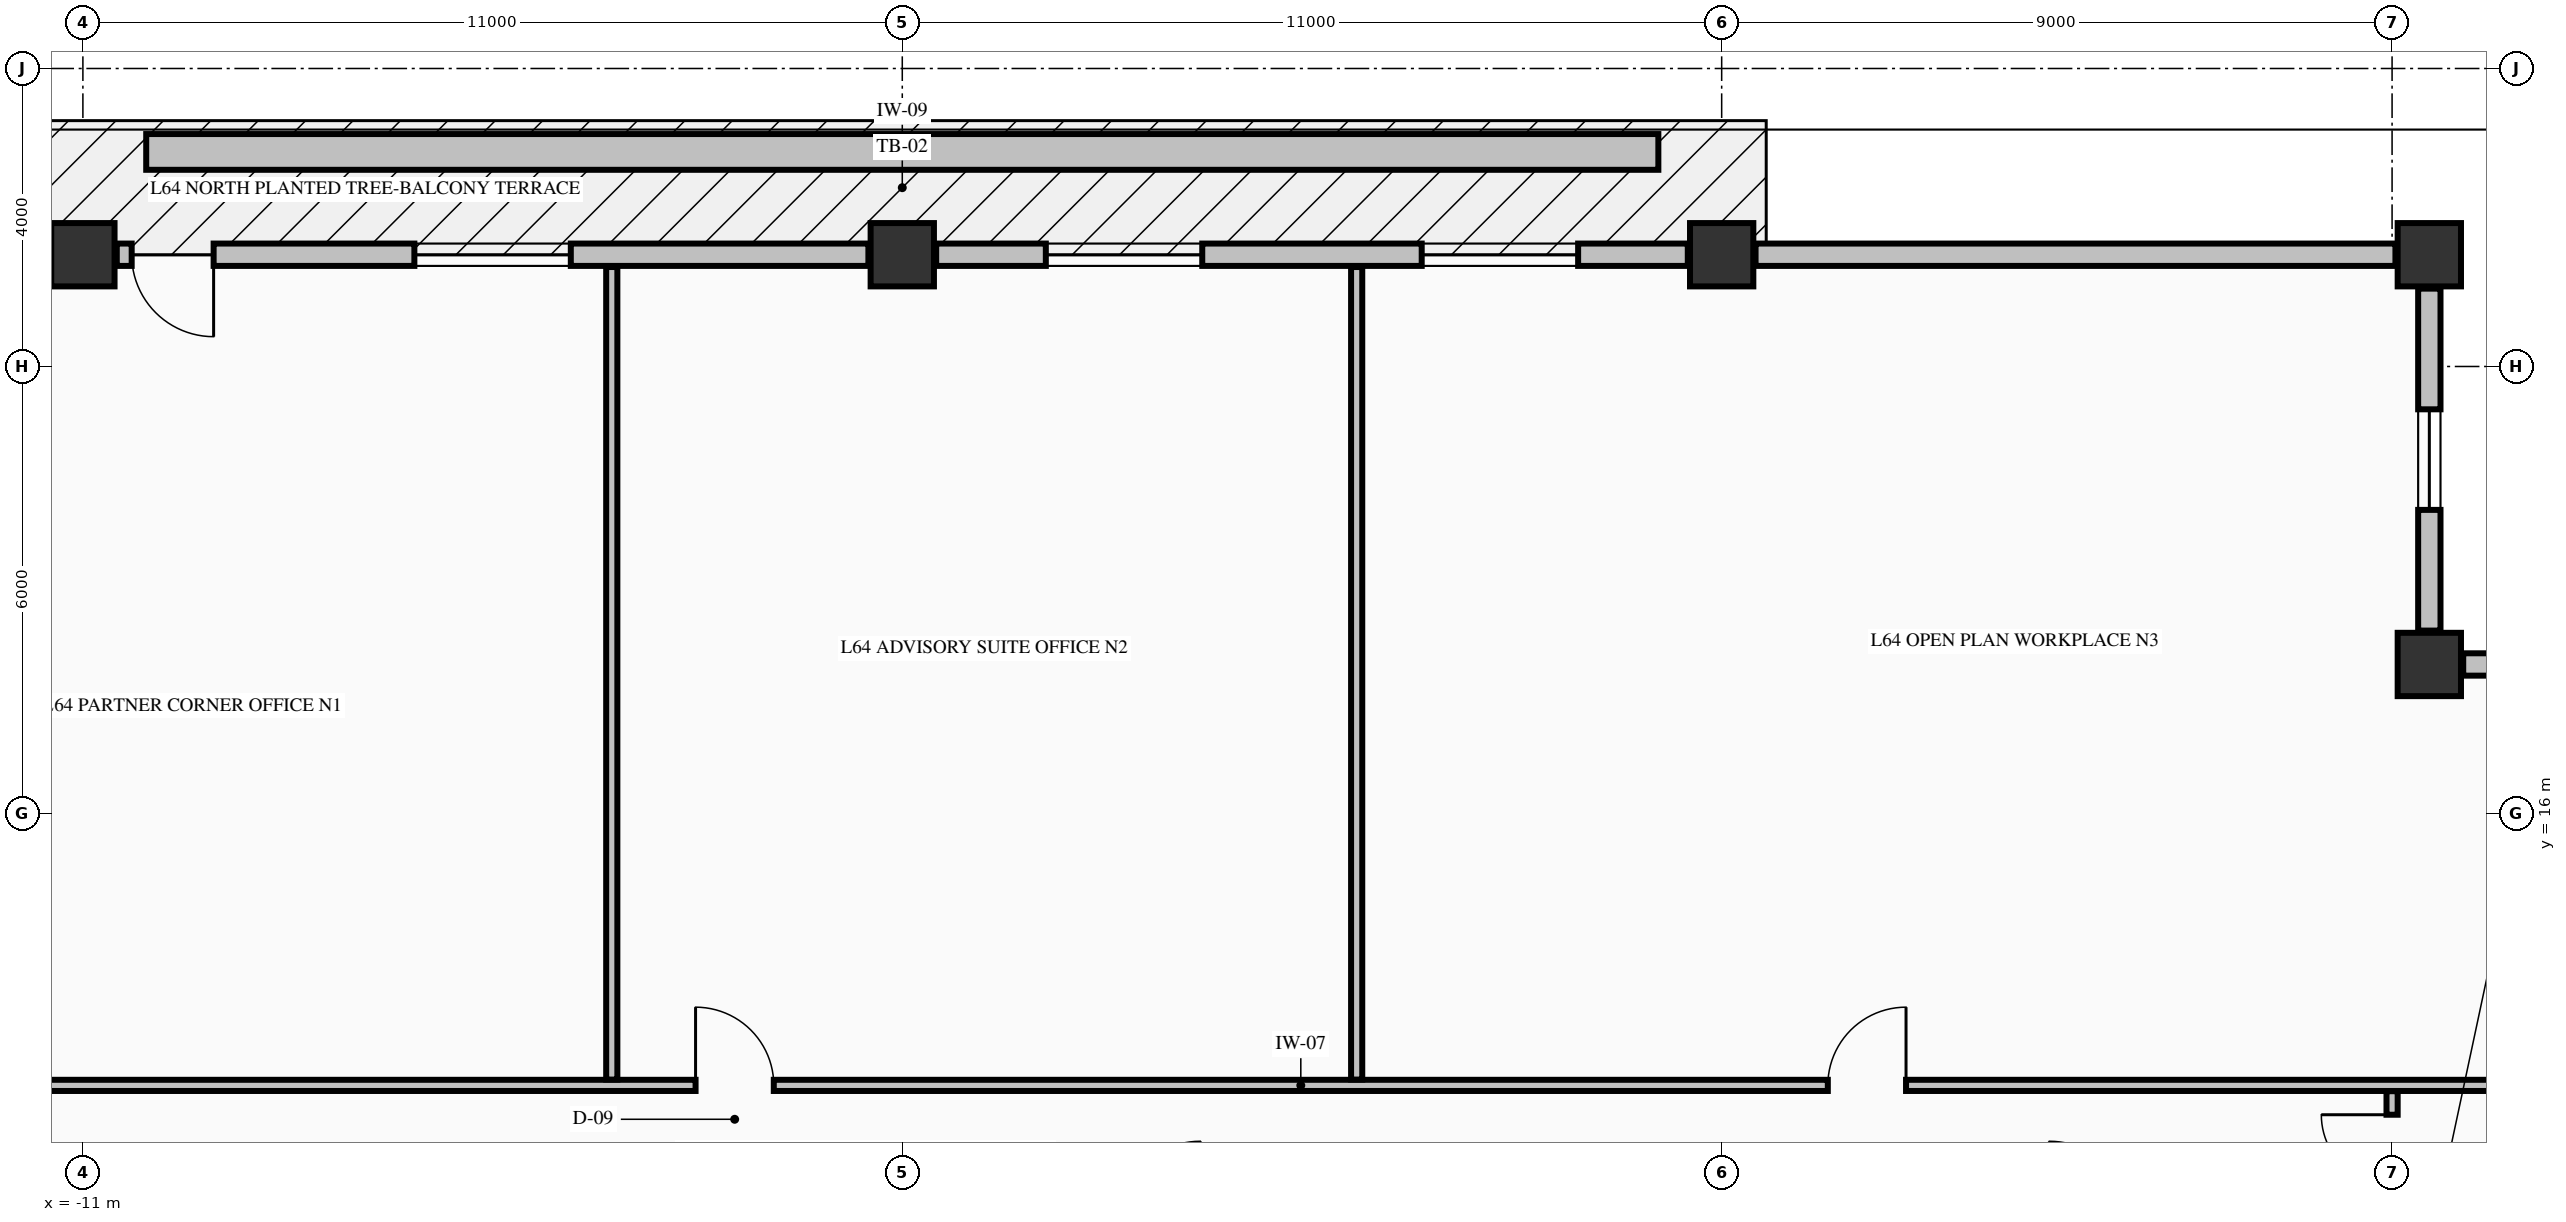
"""IFC4 building model, lengths in metres.
Left out: names, types, materials, properties, quantities, classifications, styles, units other than length and angle.
Written with IfcOpenShell. Run it as: python <this file> out.ifc"""

import sys

from ifc_helpers import new_model, si_unit, direction, frame, frame_2d, origin, origin_2d, place, context, subcontext, project, spatial, rectangle, extrude, element, fill, save


model = new_model("IFC4")
c1 = context("Model", 3, precision=1e-05, world=origin(), true_north=direction((0.0, 1.0)))
c2 = subcontext(c1, "Body", "Model", "MODEL_VIEW")
j1 = project(units=[si_unit("LENGTHUNIT", "METRE"), si_unit("PLANEANGLEUNIT", "RADIAN")], contexts=[c1])
p1 = place(None, origin())
s1 = spatial("IfcSite", under=j1, at=p1, CompositionType="ELEMENT")
p2 = place(p1, origin())
s2 = spatial("IfcBuilding", under=s1, at=p2, CompositionType="ELEMENT")
p3 = place(p2, frame((0.0, 0.0, 242.97)))
s3 = spatial("IfcBuildingStorey", under=s2, at=p3, CompositionType="ELEMENT", Elevation=242.97)
for number, where, z_axis, x_axis in (
    (1, (-11.0, 23.5, -0.25), (0.0, 0.0, 1.0), (1.0, 0.0, 0.0)),
    (2, (0.0, 23.5, -0.25), (0.0, 0.0, 1.0), (1.0, 0.0, 0.0)),
    (3, (11.0, 23.5, -0.25), (0.0, 0.0, 1.0), (1.0, 0.0, 0.0)),
    (4, (20.5, 23.5, -0.25), (0.0, 0.0, 1.0), (1.0, 0.0, 0.0)),
    (5, (20.5, 18.0, -0.25), (0.0, 0.0, 1.0), (1.0, 0.0, 0.0)),
):
    element("IfcColumn", number, at=place(p3, frame(where, z_axis=z_axis, x_axis=x_axis)), inside=s3, PredefinedType="COLUMN", context=c2, shape_type="SweptSolid", body=[
        extrude(rectangle(XDim=0.85, YDim=0.85, at=origin_2d()), origin(), (0.0, 0.0, 1.0), 3.23),
    ])
p4 = place(p3, frame((25.545, 18.0, 0.0), z_axis=(0.0, 0.0, 1.0), x_axis=(-1.0, 0.0, 0.0)))
e6 = element("IfcWall", 6, at=p4, inside=s3, PredefinedType="STANDARD", context=c2, shape_type="SweptSolid", body=[
    extrude(rectangle(XDim=4.59, YDim=0.3, at=frame_2d((2.295, 0.0))), origin(), (0.0, 0.0, 1.0), 2.372),
])
p5 = place(p4, frame((1.62, 0.0, 0.68)))
e7 = element("IfcOpeningElement", 7, at=p5, cuts=e6, PredefinedType="OPENING", context=c2, shape_type="SweptSolid", body=[
    extrude(rectangle(XDim=1.35, YDim=1.42, at=frame_2d((0.675, 0.71))), frame((0.0, 0.16, 0.0), z_axis=(0.0, -1.0, 0.0), x_axis=(1.0, 0.0, 0.0)), (0.0, 0.0, 1.0), 0.32),
])
p6 = place(p3, frame((20.5, 18.455, 0.0), z_axis=(0.0, 0.0, 1.0), x_axis=(0.0, 1.0, 0.0)))
e8 = element("IfcWall", 8, at=p6, inside=s3, PredefinedType="STANDARD", context=c2, shape_type="SweptSolid", body=[
    extrude(rectangle(XDim=4.59, YDim=0.3, at=frame_2d((2.295, 0.0))), origin(), (0.0, 0.0, 1.0), 2.372),
])
p7 = place(p6, frame((1.62, 0.0, 0.68)))
e9 = element("IfcOpeningElement", 9, at=p7, cuts=e8, PredefinedType="OPENING", context=c2, shape_type="SweptSolid", body=[
    extrude(rectangle(XDim=1.35, YDim=1.42, at=frame_2d((0.675, 0.71))), frame((0.0, 0.16, 0.0), z_axis=(0.0, -1.0, 0.0), x_axis=(1.0, 0.0, 0.0)), (0.0, 0.0, 1.0), 0.32),
])
p8 = place(p3, frame((-0.455, 23.5, 0.0), z_axis=(0.0, 0.0, 1.0), x_axis=(-1.0, 0.0, 0.0)))
e10 = element("IfcWall", 10, at=p8, inside=s3, PredefinedType="STANDARD", context=c2, shape_type="SweptSolid", body=[
    extrude(rectangle(XDim=10.09, YDim=0.3, at=frame_2d((5.045, 0.0))), origin(), (0.0, 0.0, 1.0), 2.372),
])
p9 = place(p8, frame((8.79, 0.0, 0.0)))
e11 = element("IfcOpeningElement", 11, at=p9, cuts=e10, PredefinedType="OPENING", context=c2, shape_type="SweptSolid", body=[
    extrude(rectangle(XDim=1.1, YDim=2.15, at=frame_2d((0.55, 1.075))), frame((0.0, 0.16, 0.0), z_axis=(0.0, -1.0, 0.0), x_axis=(1.0, 0.0, 0.0)), (0.0, 0.0, 1.0), 0.32),
])
p10 = place(p8, frame((3.995, 0.0, 0.7)))
e12 = element("IfcOpeningElement", 12, at=p10, cuts=e10, PredefinedType="OPENING", context=c2, shape_type="SweptSolid", body=[
    extrude(rectangle(XDim=2.1, YDim=1.5, at=frame_2d((1.05, 0.75))), frame((0.0, 0.16, 0.0), z_axis=(0.0, -1.0, 0.0), x_axis=(1.0, 0.0, 0.0)), (0.0, 0.0, 1.0), 0.32),
])
p11 = place(p3, frame((10.545, 23.5, 0.0), z_axis=(0.0, 0.0, 1.0), x_axis=(-1.0, 0.0, 0.0)))
e13 = element("IfcWall", 13, at=p11, inside=s3, PredefinedType="STANDARD", context=c2, shape_type="SweptSolid", body=[
    extrude(rectangle(XDim=10.09, YDim=0.3, at=frame_2d((5.045, 0.0))), origin(), (0.0, 0.0, 1.0), 2.372),
])
p12 = place(p11, frame((1.472, 0.0, 0.7)))
e14 = element("IfcOpeningElement", 14, at=p12, cuts=e13, PredefinedType="OPENING", context=c2, shape_type="SweptSolid", body=[
    extrude(rectangle(XDim=2.1, YDim=1.5, at=frame_2d((1.05, 0.75))), frame((0.0, 0.16, 0.0), z_axis=(0.0, -1.0, 0.0), x_axis=(1.0, 0.0, 0.0)), (0.0, 0.0, 1.0), 0.32),
])
p13 = place(p11, frame((6.518, 0.0, 0.7)))
e15 = element("IfcOpeningElement", 15, at=p13, cuts=e13, PredefinedType="OPENING", context=c2, shape_type="SweptSolid", body=[
    extrude(rectangle(XDim=2.1, YDim=1.5, at=frame_2d((1.05, 0.75))), frame((0.0, 0.16, 0.0), z_axis=(0.0, -1.0, 0.0), x_axis=(1.0, 0.0, 0.0)), (0.0, 0.0, 1.0), 0.32),
])
p14 = place(p3, frame((20.045, 23.5, 0.0), z_axis=(0.0, 0.0, 1.0), x_axis=(-1.0, 0.0, 0.0)))
e16 = element("IfcWall", 16, at=p14, inside=s3, PredefinedType="STANDARD", context=c2, shape_type="SweptSolid", body=[
    extrude(rectangle(XDim=8.59, YDim=0.3, at=frame_2d((4.295, 0.0))), origin(), (0.0, 0.0, 1.0), 2.372),
])
p15 = place(p3, frame((-20.075, 12.35, 0.0), z_axis=(0.0, 0.0, 1.0), x_axis=(1.0, 0.0, 0.0)))
e17 = element("IfcWall", 17, at=p15, inside=s3, PredefinedType="PARTITIONING", context=c2, shape_type="SweptSolid", body=[
    extrude(rectangle(XDim=45.91, YDim=0.15, at=frame_2d((22.955, 0.0))), origin(), (0.0, 0.0, 1.0), 2.98),
])
p16 = place(p15, frame((5.7, 0.0, 0.0)))
e18 = element("IfcOpeningElement", 18, at=p16, cuts=e17, PredefinedType="OPENING", context=c2, shape_type="SweptSolid", body=[
    extrude(rectangle(XDim=1.05, YDim=2.15, at=frame_2d((0.525, 1.075))), frame((0.0, 0.085, 0.0), z_axis=(0.0, -1.0, 0.0), x_axis=(1.0, 0.0, 0.0)), (0.0, 0.0, 1.0), 0.17),
])
p17 = place(p15, frame((17.3, 0.0, 0.0)))
e19 = element("IfcOpeningElement", 19, at=p17, cuts=e17, PredefinedType="OPENING", context=c2, shape_type="SweptSolid", body=[
    extrude(rectangle(XDim=1.05, YDim=2.15, at=frame_2d((0.525, 1.075))), frame((0.0, 0.085, 0.0), z_axis=(0.0, -1.0, 0.0), x_axis=(1.0, 0.0, 0.0)), (0.0, 0.0, 1.0), 0.17),
])
p18 = place(p15, frame((32.5, 0.0, 0.0)))
e20 = element("IfcOpeningElement", 20, at=p18, cuts=e17, PredefinedType="OPENING", context=c2, shape_type="SweptSolid", body=[
    extrude(rectangle(XDim=1.05, YDim=2.15, at=frame_2d((0.525, 1.075))), frame((0.0, 0.085, 0.0), z_axis=(0.0, -1.0, 0.0), x_axis=(1.0, 0.0, 0.0)), (0.0, 0.0, 1.0), 0.17),
])
for number, where, z_axis, x_axis in (
    (21, (-3.9, 12.428, 0.0), (0.0, 0.0, 1.0), (0.0, 1.0, 0.0)),
    (22, (6.1, 12.428, 0.0), (0.0, 0.0, 1.0), (0.0, 1.0, 0.0)),
):
    element("IfcWall", number, at=place(p3, frame(where, z_axis=z_axis, x_axis=x_axis)), inside=s3, PredefinedType="PARTITIONING", context=c2, shape_type="SweptSolid", body=[
        extrude(rectangle(XDim=10.907, YDim=0.15, at=frame_2d((5.454, 0.0))), origin(), (0.0, 0.0, 1.0), 2.98),
    ])
p19 = place(p3, frame((20.0, 10.856, 0.0), z_axis=(0.0, 0.0, 1.0), x_axis=(0.0, 1.0, 0.0)))
e23 = element("IfcWall", 23, at=p19, inside=s3, PredefinedType="PARTITIONING", context=c2, shape_type="SweptSolid", body=[
    extrude(rectangle(XDim=1.416, YDim=0.15, at=frame_2d((0.708, 0.0))), origin(), (0.0, 0.0, 1.0), 2.98),
])
p20 = place(p19, frame((0.15, 0.0, 0.0)))
e24 = element("IfcOpeningElement", 24, at=p20, cuts=e23, PredefinedType="OPENING", context=c2, shape_type="SweptSolid", body=[
    extrude(rectangle(XDim=0.95, YDim=2.15, at=frame_2d((0.475, 1.075))), frame((0.0, 0.085, 0.0), z_axis=(0.0, -1.0, 0.0), x_axis=(1.0, 0.0, 0.0)), (0.0, 0.0, 1.0), 0.17),
])
p21 = place(p3, frame((-10.15, 24.88, -0.04), z_axis=(0.0, 0.0, 1.0), x_axis=(1.0, 0.0, 0.0)))
e25 = element("IfcWall", 25, at=p21, inside=s3, PredefinedType="PARAPET", context=c2, shape_type="SweptSolid", body=[
    extrude(rectangle(XDim=20.3, YDim=0.48, at=frame_2d((10.15, 0.0))), origin(), (0.0, 0.0, 1.0), 0.52),
])
p22 = place(p7, origin())
e26 = element("IfcWindow", 26, at=p22, inside=s3, PartitioningType="SINGLE_PANEL", PredefinedType="WINDOW", context=c2, shape_type="SweptSolid", body=[
    extrude(rectangle(XDim=1.35, YDim=1.42, at=frame_2d((0.675, 0.71))), frame((0.0, 0.03, 0.0), z_axis=(0.0, -1.0, 0.0), x_axis=(1.0, 0.0, 0.0)), (0.0, 0.0, 1.0), 0.06),
])
fill(e9, e26)
p23 = place(p9, origin())
e27 = element("IfcDoor", 27, at=p23, inside=s3, OperationType="SINGLE_SWING_LEFT", PredefinedType="DOOR", context=c2, shape_type="SweptSolid", body=[
    extrude(rectangle(XDim=1.1, YDim=2.15, at=frame_2d((0.55, 1.075))), frame((0.0, 0.025, 0.0), z_axis=(0.0, -1.0, 0.0), x_axis=(1.0, 0.0, 0.0)), (0.0, 0.0, 1.0), 0.05),
])
fill(e11, e27)
p24 = place(p10, origin())
e28 = element("IfcWindow", 28, at=p24, inside=s3, PartitioningType="SINGLE_PANEL", PredefinedType="WINDOW", context=c2, shape_type="SweptSolid", body=[
    extrude(rectangle(XDim=2.1, YDim=1.5, at=frame_2d((1.05, 0.75))), frame((0.0, 0.03, 0.0), z_axis=(0.0, -1.0, 0.0), x_axis=(1.0, 0.0, 0.0)), (0.0, 0.0, 1.0), 0.06),
])
fill(e12, e28)
p25 = place(p12, origin())
e29 = element("IfcWindow", 29, at=p25, inside=s3, PartitioningType="SINGLE_PANEL", PredefinedType="WINDOW", context=c2, shape_type="SweptSolid", body=[
    extrude(rectangle(XDim=2.1, YDim=1.5, at=frame_2d((1.05, 0.75))), frame((0.0, 0.03, 0.0), z_axis=(0.0, -1.0, 0.0), x_axis=(1.0, 0.0, 0.0)), (0.0, 0.0, 1.0), 0.06),
])
fill(e14, e29)
p26 = place(p13, origin())
e30 = element("IfcWindow", 30, at=p26, inside=s3, PartitioningType="SINGLE_PANEL", PredefinedType="WINDOW", context=c2, shape_type="SweptSolid", body=[
    extrude(rectangle(XDim=2.1, YDim=1.5, at=frame_2d((1.05, 0.75))), frame((0.0, 0.03, 0.0), z_axis=(0.0, -1.0, 0.0), x_axis=(1.0, 0.0, 0.0)), (0.0, 0.0, 1.0), 0.06),
])
fill(e15, e30)
p27 = place(p17, origin())
e31 = element("IfcDoor", 31, at=p27, inside=s3, OperationType="SINGLE_SWING_LEFT", PredefinedType="DOOR", context=c2, shape_type="SweptSolid", body=[
    extrude(rectangle(XDim=1.05, YDim=2.15, at=frame_2d((0.525, 1.075))), frame((0.0, 0.025, 0.0), z_axis=(0.0, -1.0, 0.0), x_axis=(1.0, 0.0, 0.0)), (0.0, 0.0, 1.0), 0.05),
])
fill(e19, e31)
p28 = place(p18, origin())
e32 = element("IfcDoor", 32, at=p28, inside=s3, OperationType="SINGLE_SWING_RIGHT", PredefinedType="DOOR", context=c2, shape_type="SweptSolid", body=[
    extrude(rectangle(XDim=1.05, YDim=2.15, at=frame_2d((0.525, 1.075))), frame((0.0, 0.025, 0.0), z_axis=(0.0, -1.0, 0.0), x_axis=(1.0, 0.0, 0.0)), (0.0, 0.0, 1.0), 0.05),
])
fill(e20, e32)
p29 = place(p20, origin())
e33 = element("IfcDoor", 33, at=p29, inside=s3, OperationType="SINGLE_SWING_RIGHT", PredefinedType="DOOR", context=c2, shape_type="SweptSolid", body=[
    extrude(rectangle(XDim=0.95, YDim=2.15, at=frame_2d((0.475, 1.075))), frame((0.0, 0.025, 0.0), z_axis=(0.0, -1.0, 0.0), x_axis=(1.0, 0.0, 0.0)), (0.0, 0.0, 1.0), 0.05),
])
fill(e24, e33)
save(model, sys.argv[1])
